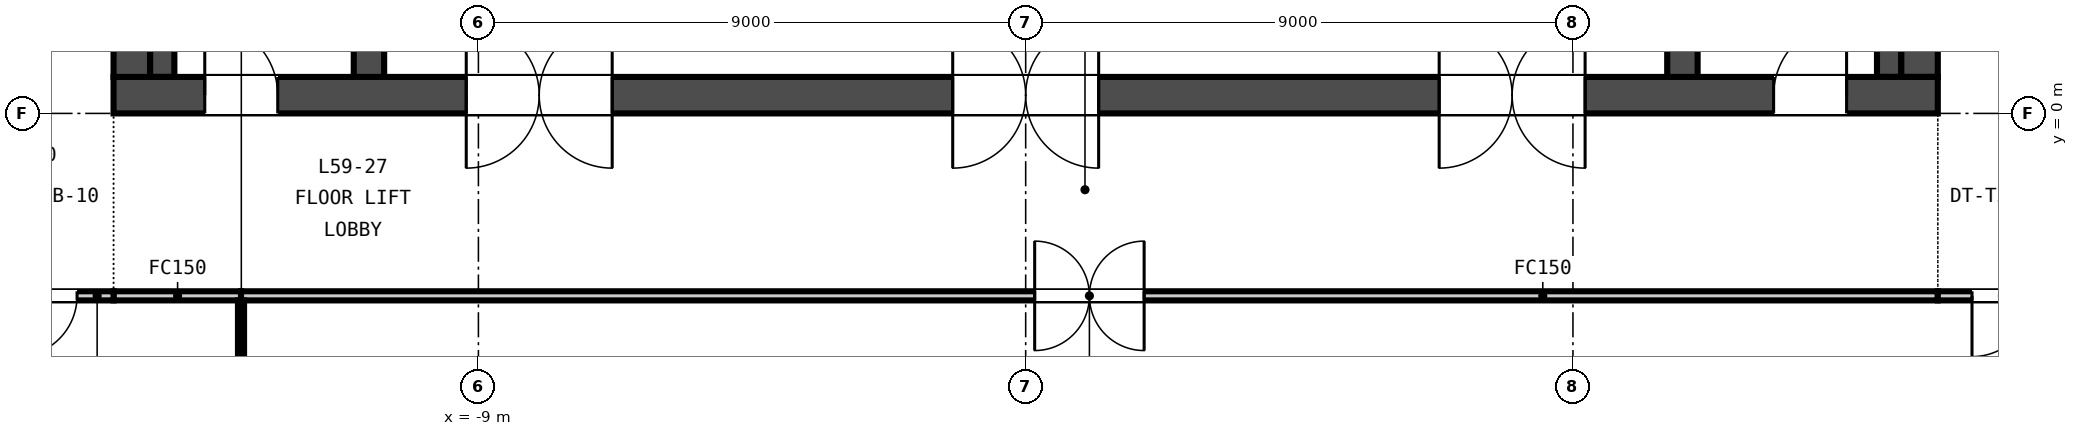
"""IFC4 building model, lengths in metres.
Left out: names, types, materials, properties, quantities, classifications, styles, units other than length and angle.
Written with IfcOpenShell. Run it as: python <this file> out.ifc"""

import sys

from ifc_helpers import new_model, si_unit, direction, frame, frame_2d, origin, place, context, subcontext, project, spatial, rectangle, extrude, element, fill, save


model = new_model("IFC4")
c1 = context("Model", 3, precision=1e-05, world=origin(), true_north=direction((0.0, 1.0)))
c2 = subcontext(c1, "Body", "Model", "MODEL_VIEW")
j1 = project(units=[si_unit("LENGTHUNIT", "METRE"), si_unit("PLANEANGLEUNIT", "RADIAN")], contexts=[c1])
p1 = place(None, origin())
s1 = spatial("IfcSite", under=j1, at=p1, CompositionType="ELEMENT")
p2 = place(p1, origin())
s2 = spatial("IfcBuilding", under=s1, at=p2, CompositionType="ELEMENT")
p3 = place(p2, frame((0.0, 0.0, 234.55)))
s3 = spatial("IfcBuildingStorey", under=s2, at=p3, CompositionType="ELEMENT", Elevation=234.55)
p4 = place(p3, frame((-15.0, 0.3, -0.15), z_axis=(0.0, 0.0, 1.0), x_axis=(1.0, 0.0, 0.0)))
e1 = element("IfcWall", 1, at=p4, inside=s3, PredefinedType="SOLIDWALL", context=c2, shape_type="SweptSolid", body=[
    extrude(rectangle(XDim=30.0, YDim=0.6, at=frame_2d((15.0, 0.0))), origin(), (0.0, 0.0, 1.0), 3.65),
])
p5 = place(p4, frame((5.8, 0.0, 0.15)))
e2 = element("IfcOpeningElement", 2, at=p5, cuts=e1, PredefinedType="OPENING", context=c2, shape_type="SweptSolid", body=[
    extrude(rectangle(XDim=2.4, YDim=2.4, at=frame_2d((1.2, 1.2))), frame((0.0, 0.31, 0.0), z_axis=(0.0, -1.0, 0.0), x_axis=(1.0, 0.0, 0.0)), (0.0, 0.0, 1.0), 0.62),
])
p6 = place(p4, frame((13.8, 0.0, 0.15)))
e3 = element("IfcOpeningElement", 3, at=p6, cuts=e1, PredefinedType="OPENING", context=c2, shape_type="SweptSolid", body=[
    extrude(rectangle(XDim=2.4, YDim=2.4, at=frame_2d((1.2, 1.2))), frame((0.0, 0.31, 0.0), z_axis=(0.0, -1.0, 0.0), x_axis=(1.0, 0.0, 0.0)), (0.0, 0.0, 1.0), 0.62),
])
p7 = place(p4, frame((21.8, 0.0, 0.15)))
e4 = element("IfcOpeningElement", 4, at=p7, cuts=e1, PredefinedType="OPENING", context=c2, shape_type="SweptSolid", body=[
    extrude(rectangle(XDim=2.4, YDim=2.4, at=frame_2d((1.2, 1.2))), frame((0.0, 0.31, 0.0), z_axis=(0.0, -1.0, 0.0), x_axis=(1.0, 0.0, 0.0)), (0.0, 0.0, 1.0), 0.62),
])
p8 = place(p4, frame((1.5, 0.0, 0.15)))
e5 = element("IfcOpeningElement", 5, at=p8, cuts=e1, PredefinedType="OPENING", context=c2, shape_type="SweptSolid", body=[
    extrude(rectangle(XDim=1.2, YDim=2.1, at=frame_2d((0.6, 1.05))), frame((0.0, 0.31, 0.0), z_axis=(0.0, -1.0, 0.0), x_axis=(1.0, 0.0, 0.0)), (0.0, 0.0, 1.0), 0.62),
])
p9 = place(p4, frame((27.3, 0.0, 0.15)))
e6 = element("IfcOpeningElement", 6, at=p9, cuts=e1, PredefinedType="OPENING", context=c2, shape_type="SweptSolid", body=[
    extrude(rectangle(XDim=1.2, YDim=2.1, at=frame_2d((0.6, 1.05))), frame((0.0, 0.31, 0.0), z_axis=(0.0, -1.0, 0.0), x_axis=(1.0, 0.0, 0.0)), (0.0, 0.0, 1.0), 0.62),
])
for number, where, z_axis, x_axis in (
    (7, (-14.7, 0.6, -0.15), (0.0, 0.0, 1.0), (0.0, 1.0, 0.0)),
    (8, (14.7, 0.6, -0.15), (0.0, 0.0, 1.0), (0.0, 1.0, 0.0)),
):
    element("IfcWall", number, at=place(p3, frame(where, z_axis=z_axis, x_axis=x_axis)), inside=s3, PredefinedType="SOLIDWALL", context=c2, shape_type="SweptSolid", body=[
        extrude(rectangle(XDim=13.8, YDim=0.6, at=frame_2d((6.9, 0.0))), origin(), (0.0, 0.0, 1.0), 3.65),
    ])
for number, where, z_axis, x_axis in (
    (9, (-10.8, 0.6, -0.15), (0.0, 0.0, 1.0), (0.0, 1.0, 0.0)),
    (10, (10.8, 0.6, -0.15), (0.0, 0.0, 1.0), (0.0, 1.0, 0.0)),
):
    element("IfcWall", number, at=place(p3, frame(where, z_axis=z_axis, x_axis=x_axis)), inside=s3, PredefinedType="SOLIDWALL", context=c2, shape_type="SweptSolid", body=[
        extrude(rectangle(XDim=13.8, YDim=0.5, at=frame_2d((6.9, 0.0))), origin(), (0.0, 0.0, 1.0), 3.65),
    ])
for number, where, z_axis, x_axis in (
    (11, (-14.2, 0.6, 0.0), (0.0, 0.0, 1.0), (0.0, 1.0, 0.0)),
    (12, (14.2, 0.6, 0.0), (0.0, 0.0, 1.0), (0.0, 1.0, 0.0)),
):
    element("IfcWall", number, at=place(p3, frame(where, z_axis=z_axis, x_axis=x_axis)), inside=s3, PredefinedType="SOLIDWALL", context=c2, shape_type="SweptSolid", body=[
        extrude(rectangle(XDim=13.8, YDim=0.4, at=frame_2d((6.9, 0.0))), origin(), (0.0, 0.0, 1.0), 3.5),
    ])
p10 = place(p3, frame((-12.904, -3.0, 0.0), z_axis=(0.0, 0.0, 1.0), x_axis=(-1.0, 0.0, 0.0)))
e13 = element("IfcWall", 13, at=p10, inside=s3, PredefinedType="PARTITIONING", context=c2, shape_type="SweptSolid", body=[
    extrude(rectangle(XDim=2.096, YDim=0.15, at=frame_2d((1.048, 0.0))), origin(), (0.0, 0.0, 1.0), 2.751),
])
p11 = place(p3, frame((15.0, -3.0, 0.0), z_axis=(0.0, 0.0, 1.0), x_axis=(-1.0, 0.0, 0.0)))
e14 = element("IfcWall", 14, at=p11, inside=s3, PredefinedType="PARTITIONING", context=c2, shape_type="SweptSolid", body=[
    extrude(rectangle(XDim=27.904, YDim=0.15, at=frame_2d((13.952, 0.0))), origin(), (0.0, 0.0, 1.0), 2.751),
])
p12 = place(p11, frame((13.052, 0.0, 0.0)))
e15 = element("IfcOpeningElement", 15, at=p12, cuts=e14, PredefinedType="OPENING", context=c2, shape_type="SweptSolid", body=[
    extrude(rectangle(XDim=1.8, YDim=2.1, at=frame_2d((0.9, 1.05))), frame((0.0, 0.085, 0.0), z_axis=(0.0, -1.0, 0.0), x_axis=(1.0, 0.0, 0.0)), (0.0, 0.0, 1.0), 0.17),
])
p13 = place(p3, frame((-15.0, -3.0, 0.0), z_axis=(0.0, 0.0, 1.0), x_axis=(-1.0, 0.0, 0.0)))
e16 = element("IfcWall", 16, at=p13, inside=s3, PredefinedType="PARTITIONING", context=c2, shape_type="SweptSolid", body=[
    extrude(rectangle(XDim=2.2, YDim=0.15, at=frame_2d((1.1, 0.0))), origin(), (0.0, 0.0, 1.0), 2.751),
])
p14 = place(p13, frame((0.6, 0.0, 0.0)))
e17 = element("IfcOpeningElement", 17, at=p14, cuts=e16, PredefinedType="OPENING", context=c2, shape_type="SweptSolid", body=[
    extrude(rectangle(XDim=1.0, YDim=2.1, at=frame_2d((0.5, 1.05))), frame((0.0, 0.085, 0.0), z_axis=(0.0, -1.0, 0.0), x_axis=(1.0, 0.0, 0.0)), (0.0, 0.0, 1.0), 0.17),
])
p15 = place(p3, frame((17.125, -3.0, 0.0), z_axis=(0.0, 0.0, 1.0), x_axis=(-1.0, 0.0, 0.0)))
e18 = element("IfcWall", 18, at=p15, inside=s3, PredefinedType="PARTITIONING", context=c2, shape_type="SweptSolid", body=[
    extrude(rectangle(XDim=2.125, YDim=0.15, at=frame_2d((1.062, 0.0))), origin(), (0.0, 0.0, 1.0), 2.751),
])
p16 = place(p15, frame((0.562, 0.0, 0.0)))
e19 = element("IfcOpeningElement", 19, at=p16, cuts=e18, PredefinedType="OPENING", context=c2, shape_type="SweptSolid", body=[
    extrude(rectangle(XDim=1.0, YDim=2.1, at=frame_2d((0.5, 1.05))), frame((0.0, 0.085, 0.0), z_axis=(0.0, -1.0, 0.0), x_axis=(1.0, 0.0, 0.0)), (0.0, 0.0, 1.0), 0.17),
])
p17 = place(p3, frame((-12.904, -10.596, 0.0), z_axis=(0.0, 0.0, 1.0), x_axis=(0.0, 1.0, 0.0)))
e20 = element("IfcWall", 20, at=p17, inside=s3, PredefinedType="PARTITIONING", context=c2, shape_type="SweptSolid", body=[
    extrude(rectangle(XDim=7.521, YDim=0.1, at=frame_2d((3.76, 0.0))), origin(), (0.0, 0.0, 1.0), 2.751),
])
p18 = place(p5, origin())
e21 = element("IfcDoor", 21, at=p18, inside=s3, OperationType="DOUBLE_DOOR_DOUBLE_SWING", PredefinedType="DOOR", context=c2, shape_type="SweptSolid", body=[
    extrude(rectangle(XDim=2.4, YDim=2.4, at=frame_2d((1.2, 1.2))), frame((0.0, 0.025, 0.0), z_axis=(0.0, -1.0, 0.0), x_axis=(1.0, 0.0, 0.0)), (0.0, 0.0, 1.0), 0.05),
])
fill(e2, e21)
p19 = place(p6, origin())
e22 = element("IfcDoor", 22, at=p19, inside=s3, OperationType="DOUBLE_DOOR_DOUBLE_SWING", PredefinedType="DOOR", context=c2, shape_type="SweptSolid", body=[
    extrude(rectangle(XDim=2.4, YDim=2.4, at=frame_2d((1.2, 1.2))), frame((0.0, 0.025, 0.0), z_axis=(0.0, -1.0, 0.0), x_axis=(1.0, 0.0, 0.0)), (0.0, 0.0, 1.0), 0.05),
])
fill(e3, e22)
p20 = place(p7, origin())
e23 = element("IfcDoor", 23, at=p20, inside=s3, OperationType="DOUBLE_DOOR_DOUBLE_SWING", PredefinedType="DOOR", context=c2, shape_type="SweptSolid", body=[
    extrude(rectangle(XDim=2.4, YDim=2.4, at=frame_2d((1.2, 1.2))), frame((0.0, 0.025, 0.0), z_axis=(0.0, -1.0, 0.0), x_axis=(1.0, 0.0, 0.0)), (0.0, 0.0, 1.0), 0.05),
])
fill(e4, e23)
p21 = place(p8, origin())
e24 = element("IfcDoor", 24, at=p21, inside=s3, OperationType="SINGLE_SWING_LEFT", PredefinedType="DOOR", context=c2, shape_type="SweptSolid", body=[
    extrude(rectangle(XDim=1.2, YDim=2.1, at=frame_2d((0.6, 1.05))), frame((0.0, 0.025, 0.0), z_axis=(0.0, -1.0, 0.0), x_axis=(1.0, 0.0, 0.0)), (0.0, 0.0, 1.0), 0.05),
])
fill(e5, e24)
p22 = place(p9, origin())
e25 = element("IfcDoor", 25, at=p22, inside=s3, OperationType="SINGLE_SWING_RIGHT", PredefinedType="DOOR", context=c2, shape_type="SweptSolid", body=[
    extrude(rectangle(XDim=1.2, YDim=2.1, at=frame_2d((0.6, 1.05))), frame((0.0, 0.025, 0.0), z_axis=(0.0, -1.0, 0.0), x_axis=(1.0, 0.0, 0.0)), (0.0, 0.0, 1.0), 0.05),
])
fill(e6, e25)
p23 = place(p14, origin())
e26 = element("IfcDoor", 26, at=p23, inside=s3, OperationType="SINGLE_SWING_RIGHT", PredefinedType="DOOR", context=c2, shape_type="SweptSolid", body=[
    extrude(rectangle(XDim=1.0, YDim=2.1, at=frame_2d((0.5, 1.05))), frame((0.0, 0.025, 0.0), z_axis=(0.0, -1.0, 0.0), x_axis=(1.0, 0.0, 0.0)), (0.0, 0.0, 1.0), 0.05),
])
fill(e17, e26)
p24 = place(p12, origin())
e27 = element("IfcDoor", 27, at=p24, inside=s3, OperationType="DOUBLE_DOOR_DOUBLE_SWING", PredefinedType="DOOR", context=c2, shape_type="SweptSolid", body=[
    extrude(rectangle(XDim=1.8, YDim=2.1, at=frame_2d((0.9, 1.05))), frame((0.0, 0.025, 0.0), z_axis=(0.0, -1.0, 0.0), x_axis=(1.0, 0.0, 0.0)), (0.0, 0.0, 1.0), 0.05),
])
fill(e15, e27)
p25 = place(p16, origin())
e28 = element("IfcDoor", 28, at=p25, inside=s3, OperationType="SINGLE_SWING_RIGHT", PredefinedType="DOOR", context=c2, shape_type="SweptSolid", body=[
    extrude(rectangle(XDim=1.0, YDim=2.1, at=frame_2d((0.5, 1.05))), frame((0.0, 0.025, 0.0), z_axis=(0.0, -1.0, 0.0), x_axis=(1.0, 0.0, 0.0)), (0.0, 0.0, 1.0), 0.05),
])
fill(e19, e28)
save(model, sys.argv[1])
